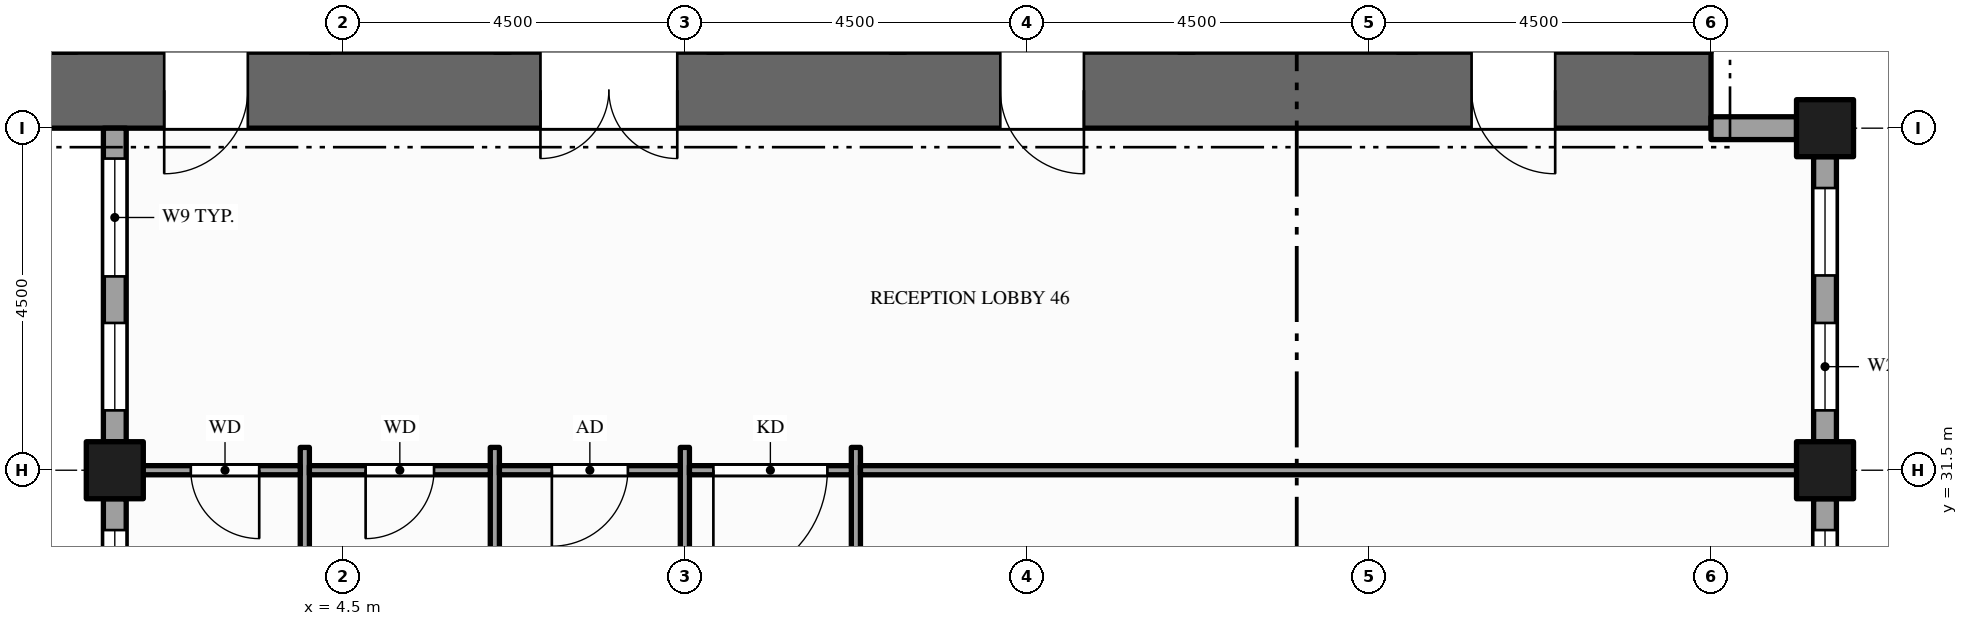
"""IFC4 building model, lengths in metres.
Left out: names, types, materials, properties, quantities, classifications, styles, units other than length and angle.
Written with IfcOpenShell. Run it as: python <this file> out.ifc"""

import sys

from ifc_helpers import new_model, si_unit, direction, frame, frame_2d, origin, origin_2d, place, context, subcontext, project, spatial, rectangle, hollow_rectangle, extrude, element, fill, save


model = new_model("IFC4")
c1 = context("Model", 3, precision=1e-05, world=origin(), true_north=direction((0.0, 1.0)))
c2 = subcontext(c1, "Body", "Model", "MODEL_VIEW")
j1 = project(units=[si_unit("LENGTHUNIT", "METRE"), si_unit("PLANEANGLEUNIT", "RADIAN")], contexts=[c1])
p1 = place(None, origin())
s1 = spatial("IfcSite", under=j1, at=p1, CompositionType="ELEMENT")
p2 = place(p1, origin())
s2 = spatial("IfcBuilding", under=s1, at=p2, CompositionType="ELEMENT")
p3 = place(p2, frame((0.0, 0.0, 235.0)))
s3 = spatial("IfcBuildingStorey", under=s2, at=p3, CompositionType="ELEMENT", Elevation=235.0)
p4 = place(p3, frame((0.0, 36.5, -0.15), z_axis=(0.0, 0.0, 1.0), x_axis=(1.0, 0.0, 0.0)))
e1 = element("IfcWall", 1, at=p4, inside=s3, PredefinedType="SHEAR", context=c2, shape_type="SweptSolid", body=[
    extrude(rectangle(XDim=22.5, YDim=1.0, at=frame_2d((11.25, 0.0))), origin(), (0.0, 0.0, 1.0), 4.0),
])
p5 = place(p4, frame((7.1, 0.0, 0.15)))
e2 = element("IfcOpeningElement", 2, at=p5, cuts=e1, PredefinedType="OPENING", context=c2, shape_type="SweptSolid", body=[
    extrude(rectangle(XDim=1.8, YDim=2.1, at=frame_2d((0.9, 1.05))), frame((0.0, 0.51, 0.0), z_axis=(0.0, -1.0, 0.0), x_axis=(1.0, 0.0, 0.0)), (0.0, 0.0, 1.0), 1.02),
])
p6 = place(p4, frame((13.15, 0.0, 0.15)))
e3 = element("IfcOpeningElement", 3, at=p6, cuts=e1, PredefinedType="OPENING", context=c2, shape_type="SweptSolid", body=[
    extrude(rectangle(XDim=1.1, YDim=2.1, at=frame_2d((0.55, 1.05))), frame((0.0, 0.51, 0.0), z_axis=(0.0, -1.0, 0.0), x_axis=(1.0, 0.0, 0.0)), (0.0, 0.0, 1.0), 1.02),
])
p7 = place(p4, frame((2.15, 0.0, 0.15)))
e4 = element("IfcOpeningElement", 4, at=p7, cuts=e1, PredefinedType="OPENING", context=c2, shape_type="SweptSolid", body=[
    extrude(rectangle(XDim=1.1, YDim=2.1, at=frame_2d((0.55, 1.05))), frame((0.0, 0.51, 0.0), z_axis=(0.0, -1.0, 0.0), x_axis=(1.0, 0.0, 0.0)), (0.0, 0.0, 1.0), 1.02),
])
p8 = place(p4, frame((19.35, 0.0, 0.15)))
e5 = element("IfcOpeningElement", 5, at=p8, cuts=e1, PredefinedType="OPENING", context=c2, shape_type="SweptSolid", body=[
    extrude(rectangle(XDim=1.1, YDim=2.1, at=frame_2d((0.55, 1.05))), frame((0.0, 0.51, 0.0), z_axis=(0.0, -1.0, 0.0), x_axis=(1.0, 0.0, 0.0)), (0.0, 0.0, 1.0), 1.02),
])
for number, where, z_axis, x_axis in (
    (6, (1.5, 31.5, -0.15), (0.0, 0.0, 1.0), (1.0, 0.0, 0.0)),
    (7, (24.0, 31.5, -0.15), (0.0, 0.0, 1.0), (1.0, 0.0, 0.0)),
    (8, (24.0, 36.0, -0.15), (0.0, 0.0, 1.0), (1.0, 0.0, 0.0)),
):
    element("IfcColumn", number, at=place(p3, frame(where, z_axis=z_axis, x_axis=x_axis)), inside=s3, PredefinedType="COLUMN", context=c2, shape_type="SweptSolid", body=[
        extrude(hollow_rectangle(XDim=0.75, YDim=0.75, WallThickness=0.036, at=origin_2d()), origin(), (0.0, 0.0, 1.0), 4.0),
    ])
p9 = place(p3, frame((24.0, 25.875, 0.0), z_axis=(0.0, 0.0, 1.0), x_axis=(0.0, 1.0, 0.0)))
e9 = element("IfcWall", 9, at=p9, inside=s3, PredefinedType="STANDARD", context=c2, shape_type="SweptSolid", body=[
    extrude(rectangle(XDim=5.25, YDim=0.3, at=frame_2d((2.625, 0.0))), origin(), (0.0, 0.0, 1.0), 3.157),
])
p10 = place(p9, frame((1.425, 0.0, 0.9)))
e10 = element("IfcOpeningElement", 10, at=p10, cuts=e9, PredefinedType="OPENING", context=c2, shape_type="SweptSolid", body=[
    extrude(rectangle(XDim=1.65, YDim=2.0, at=frame_2d((0.825, 1.0))), frame((0.0, 0.16, 0.0), z_axis=(0.0, -1.0, 0.0), x_axis=(1.0, 0.0, 0.0)), (0.0, 0.0, 1.0), 0.32),
])
p11 = place(p9, frame((3.688, 0.0, 0.9)))
e11 = element("IfcOpeningElement", 11, at=p11, cuts=e9, PredefinedType="OPENING", context=c2, shape_type="SweptSolid", body=[
    extrude(rectangle(XDim=1.15, YDim=2.0, at=frame_2d((0.575, 1.0))), frame((0.0, 0.16, 0.0), z_axis=(0.0, -1.0, 0.0), x_axis=(1.0, 0.0, 0.0)), (0.0, 0.0, 1.0), 0.32),
])
p12 = place(p3, frame((24.0, 31.875, 0.0), z_axis=(0.0, 0.0, 1.0), x_axis=(0.0, 1.0, 0.0)))
e12 = element("IfcWall", 12, at=p12, inside=s3, PredefinedType="STANDARD", context=c2, shape_type="SweptSolid", body=[
    extrude(rectangle(XDim=3.75, YDim=0.3, at=frame_2d((1.875, 0.0))), origin(), (0.0, 0.0, 1.0), 3.157),
])
p13 = place(p12, frame((0.413, 0.0, 0.9)))
e13 = element("IfcOpeningElement", 13, at=p13, cuts=e12, PredefinedType="OPENING", context=c2, shape_type="SweptSolid", body=[
    extrude(rectangle(XDim=1.15, YDim=2.0, at=frame_2d((0.575, 1.0))), frame((0.0, 0.16, 0.0), z_axis=(0.0, -1.0, 0.0), x_axis=(1.0, 0.0, 0.0)), (0.0, 0.0, 1.0), 0.32),
])
p14 = place(p12, frame((2.188, 0.0, 0.9)))
e14 = element("IfcOpeningElement", 14, at=p14, cuts=e12, PredefinedType="OPENING", context=c2, shape_type="SweptSolid", body=[
    extrude(rectangle(XDim=1.15, YDim=2.0, at=frame_2d((0.575, 1.0))), frame((0.0, 0.16, 0.0), z_axis=(0.0, -1.0, 0.0), x_axis=(1.0, 0.0, 0.0)), (0.0, 0.0, 1.0), 0.32),
])
p15 = place(p3, frame((23.625, 36.0, 0.0), z_axis=(0.0, 0.0, 1.0), x_axis=(-1.0, 0.0, 0.0)))
e15 = element("IfcWall", 15, at=p15, inside=s3, PredefinedType="STANDARD", context=c2, shape_type="SweptSolid", body=[
    extrude(rectangle(XDim=1.125, YDim=0.3, at=frame_2d((0.562, 0.0))), origin(), (0.0, 0.0, 1.0), 2.87),
])
p16 = place(p3, frame((1.5, 36.0, 0.0), z_axis=(0.0, 0.0, 1.0), x_axis=(0.0, -1.0, 0.0)))
e16 = element("IfcWall", 16, at=p16, inside=s3, PredefinedType="STANDARD", context=c2, shape_type="SweptSolid", body=[
    extrude(rectangle(XDim=4.125, YDim=0.3, at=frame_2d((2.062, 0.0))), origin(), (0.0, 0.0, 1.0), 3.157),
])
p17 = place(p16, frame((0.4, 0.0, 0.9)))
e17 = element("IfcOpeningElement", 17, at=p17, cuts=e16, PredefinedType="OPENING", context=c2, shape_type="SweptSolid", body=[
    extrude(rectangle(XDim=1.55, YDim=2.0, at=frame_2d((0.775, 1.0))), frame((0.0, 0.16, 0.0), z_axis=(0.0, -1.0, 0.0), x_axis=(1.0, 0.0, 0.0)), (0.0, 0.0, 1.0), 0.32),
])
p18 = place(p16, frame((2.562, 0.0, 0.9)))
e18 = element("IfcOpeningElement", 18, at=p18, cuts=e16, PredefinedType="OPENING", context=c2, shape_type="SweptSolid", body=[
    extrude(rectangle(XDim=1.15, YDim=2.0, at=frame_2d((0.575, 1.0))), frame((0.0, 0.16, 0.0), z_axis=(0.0, -1.0, 0.0), x_axis=(1.0, 0.0, 0.0)), (0.0, 0.0, 1.0), 0.32),
])
p19 = place(p3, frame((1.5, 31.125, 0.0), z_axis=(0.0, 0.0, 1.0), x_axis=(0.0, -1.0, 0.0)))
e19 = element("IfcWall", 19, at=p19, inside=s3, PredefinedType="STANDARD", context=c2, shape_type="SweptSolid", body=[
    extrude(rectangle(XDim=3.75, YDim=0.3, at=frame_2d((1.875, 0.0))), origin(), (0.0, 0.0, 1.0), 3.157),
])
p20 = place(p19, frame((0.413, 0.0, 0.9)))
e20 = element("IfcOpeningElement", 20, at=p20, cuts=e19, PredefinedType="OPENING", context=c2, shape_type="SweptSolid", body=[
    extrude(rectangle(XDim=1.15, YDim=2.0, at=frame_2d((0.575, 1.0))), frame((0.0, 0.16, 0.0), z_axis=(0.0, -1.0, 0.0), x_axis=(1.0, 0.0, 0.0)), (0.0, 0.0, 1.0), 0.32),
])
p21 = place(p19, frame((2.188, 0.0, 0.9)))
e21 = element("IfcOpeningElement", 21, at=p21, cuts=e19, PredefinedType="OPENING", context=c2, shape_type="SweptSolid", body=[
    extrude(rectangle(XDim=1.15, YDim=2.0, at=frame_2d((0.575, 1.0))), frame((0.0, 0.16, 0.0), z_axis=(0.0, -1.0, 0.0), x_axis=(1.0, 0.0, 0.0)), (0.0, 0.0, 1.0), 0.32),
])
for number, where, z_axis, x_axis in (
    (22, (4.0, 26.7, 0.0), (0.0, 0.0, 1.0), (0.0, 1.0, 0.0)),
    (23, (6.5, 26.7, 0.0), (0.0, 0.0, 1.0), (0.0, 1.0, 0.0)),
):
    element("IfcWall", number, at=place(p3, frame(where, z_axis=z_axis, x_axis=x_axis)), inside=s3, PredefinedType="PARTITIONING", context=c2, shape_type="SweptSolid", body=[
        extrude(rectangle(XDim=5.1, YDim=0.12, at=frame_2d((2.55, 0.0))), origin(), (0.0, 0.0, 1.0), 3.85),
    ])
p22 = place(p3, frame((9.0, 13.2, 0.0), z_axis=(0.0, 0.0, 1.0), x_axis=(0.0, 1.0, 0.0)))
e24 = element("IfcWall", 24, at=p22, inside=s3, PredefinedType="PARTITIONING", context=c2, shape_type="SweptSolid", body=[
    extrude(rectangle(XDim=18.6, YDim=0.12, at=frame_2d((9.3, 0.0))), origin(), (0.0, 0.0, 1.0), 2.6),
])
p23 = place(p22, frame((3.175, 0.0, 0.0)))
e25 = element("IfcOpeningElement", 25, at=p23, cuts=e24, PredefinedType="OPENING", context=c2, shape_type="SweptSolid", body=[
    extrude(rectangle(XDim=1.0, YDim=2.1, at=frame_2d((0.5, 1.05))), frame((0.0, 0.07, 0.0), z_axis=(0.0, -1.0, 0.0), x_axis=(1.0, 0.0, 0.0)), (0.0, 0.0, 1.0), 0.14),
])
p24 = place(p22, frame((9.955, 0.0, 0.0)))
e26 = element("IfcOpeningElement", 26, at=p24, cuts=e24, PredefinedType="OPENING", context=c2, shape_type="SweptSolid", body=[
    extrude(rectangle(XDim=1.0, YDim=2.1, at=frame_2d((0.5, 1.05))), frame((0.0, 0.07, 0.0), z_axis=(0.0, -1.0, 0.0), x_axis=(1.0, 0.0, 0.0)), (0.0, 0.0, 1.0), 0.14),
])
p25 = place(p3, frame((11.25, 13.2, 0.0), z_axis=(0.0, 0.0, 1.0), x_axis=(0.0, 1.0, 0.0)))
e27 = element("IfcWall", 27, at=p25, inside=s3, PredefinedType="PARTITIONING", context=c2, shape_type="SweptSolid", body=[
    extrude(rectangle(XDim=18.6, YDim=0.12, at=frame_2d((9.3, 0.0))), origin(), (0.0, 0.0, 1.0), 2.6),
])
p26 = place(p25, frame((4.2, 0.0, 0.0)))
e28 = element("IfcOpeningElement", 28, at=p26, cuts=e27, PredefinedType="OPENING", context=c2, shape_type="SweptSolid", body=[
    extrude(rectangle(XDim=1.2, YDim=2.1, at=frame_2d((0.6, 1.05))), frame((0.0, 0.07, 0.0), z_axis=(0.0, -1.0, 0.0), x_axis=(1.0, 0.0, 0.0)), (0.0, 0.0, 1.0), 0.14),
])
p27 = place(p3, frame((1.65, 31.5, 0.0), z_axis=(0.0, 0.0, 1.0), x_axis=(1.0, 0.0, 0.0)))
e29 = element("IfcWall", 29, at=p27, inside=s3, PredefinedType="PARTITIONING", context=c2, shape_type="SweptSolid", body=[
    extrude(rectangle(XDim=2.29, YDim=0.12, at=frame_2d((1.145, 0.0))), origin(), (0.0, 0.0, 1.0), 2.87),
])
p28 = place(p27, frame((0.85, 0.0, 0.0)))
e30 = element("IfcOpeningElement", 30, at=p28, cuts=e29, PredefinedType="OPENING", context=c2, shape_type="SweptSolid", body=[
    extrude(rectangle(XDim=0.9, YDim=2.1, at=frame_2d((0.45, 1.05))), frame((0.0, 0.07, 0.0), z_axis=(0.0, -1.0, 0.0), x_axis=(1.0, 0.0, 0.0)), (0.0, 0.0, 1.0), 0.14),
])
p29 = place(p3, frame((4.06, 31.5, 0.0), z_axis=(0.0, 0.0, 1.0), x_axis=(1.0, 0.0, 0.0)))
e31 = element("IfcWall", 31, at=p29, inside=s3, PredefinedType="PARTITIONING", context=c2, shape_type="SweptSolid", body=[
    extrude(rectangle(XDim=2.38, YDim=0.12, at=frame_2d((1.19, 0.0))), origin(), (0.0, 0.0, 1.0), 2.87),
])
p30 = place(p29, frame((0.74, 0.0, 0.0)))
e32 = element("IfcOpeningElement", 32, at=p30, cuts=e31, PredefinedType="OPENING", context=c2, shape_type="SweptSolid", body=[
    extrude(rectangle(XDim=0.9, YDim=2.1, at=frame_2d((0.45, 1.05))), frame((0.0, 0.07, 0.0), z_axis=(0.0, -1.0, 0.0), x_axis=(1.0, 0.0, 0.0)), (0.0, 0.0, 1.0), 0.14),
])
p31 = place(p3, frame((6.56, 31.5, 0.0), z_axis=(0.0, 0.0, 1.0), x_axis=(1.0, 0.0, 0.0)))
e33 = element("IfcWall", 33, at=p31, inside=s3, PredefinedType="PARTITIONING", context=c2, shape_type="SweptSolid", body=[
    extrude(rectangle(XDim=2.38, YDim=0.12, at=frame_2d((1.19, 0.0))), origin(), (0.0, 0.0, 1.0), 2.87),
])
p32 = place(p31, frame((0.69, 0.0, 0.0)))
e34 = element("IfcOpeningElement", 34, at=p32, cuts=e33, PredefinedType="OPENING", context=c2, shape_type="SweptSolid", body=[
    extrude(rectangle(XDim=1.0, YDim=2.1, at=frame_2d((0.5, 1.05))), frame((0.0, 0.07, 0.0), z_axis=(0.0, -1.0, 0.0), x_axis=(1.0, 0.0, 0.0)), (0.0, 0.0, 1.0), 0.14),
])
p33 = place(p3, frame((9.06, 31.5, 0.0), z_axis=(0.0, 0.0, 1.0), x_axis=(1.0, 0.0, 0.0)))
e35 = element("IfcWall", 35, at=p33, inside=s3, PredefinedType="PARTITIONING", context=c2, shape_type="SweptSolid", body=[
    extrude(rectangle(XDim=2.13, YDim=0.12, at=frame_2d((1.065, 0.0))), origin(), (0.0, 0.0, 1.0), 2.87),
])
p34 = place(p33, frame((0.315, 0.0, 0.0)))
e36 = element("IfcOpeningElement", 36, at=p34, cuts=e35, PredefinedType="OPENING", context=c2, shape_type="SweptSolid", body=[
    extrude(rectangle(XDim=1.5, YDim=2.1, at=frame_2d((0.75, 1.05))), frame((0.0, 0.07, 0.0), z_axis=(0.0, -1.0, 0.0), x_axis=(1.0, 0.0, 0.0)), (0.0, 0.0, 1.0), 0.14),
])
p35 = place(p3, frame((11.31, 31.5, 0.0), z_axis=(0.0, 0.0, 1.0), x_axis=(1.0, 0.0, 0.0)))
e37 = element("IfcWall", 37, at=p35, inside=s3, PredefinedType="PARTITIONING", context=c2, shape_type="SweptSolid", body=[
    extrude(rectangle(XDim=12.54, YDim=0.12, at=frame_2d((6.27, 0.0))), origin(), (0.0, 0.0, 1.0), 2.87),
])
p36 = place(p11, origin())
e38 = element("IfcWindow", 38, at=p36, inside=s3, PartitioningType="SINGLE_PANEL", PredefinedType="WINDOW", context=c2, shape_type="SweptSolid", body=[
    extrude(rectangle(XDim=1.15, YDim=2.0, at=frame_2d((0.575, 1.0))), frame((0.0, 0.03, 0.0), z_axis=(0.0, -1.0, 0.0), x_axis=(1.0, 0.0, 0.0)), (0.0, 0.0, 1.0), 0.06),
])
fill(e11, e38)
p37 = place(p13, origin())
e39 = element("IfcWindow", 39, at=p37, inside=s3, PartitioningType="SINGLE_PANEL", PredefinedType="WINDOW", context=c2, shape_type="SweptSolid", body=[
    extrude(rectangle(XDim=1.15, YDim=2.0, at=frame_2d((0.575, 1.0))), frame((0.0, 0.03, 0.0), z_axis=(0.0, -1.0, 0.0), x_axis=(1.0, 0.0, 0.0)), (0.0, 0.0, 1.0), 0.06),
])
fill(e13, e39)
p38 = place(p14, origin())
e40 = element("IfcWindow", 40, at=p38, inside=s3, PartitioningType="SINGLE_PANEL", PredefinedType="WINDOW", context=c2, shape_type="SweptSolid", body=[
    extrude(rectangle(XDim=1.15, YDim=2.0, at=frame_2d((0.575, 1.0))), frame((0.0, 0.03, 0.0), z_axis=(0.0, -1.0, 0.0), x_axis=(1.0, 0.0, 0.0)), (0.0, 0.0, 1.0), 0.06),
])
fill(e14, e40)
p39 = place(p17, origin())
e41 = element("IfcWindow", 41, at=p39, inside=s3, PartitioningType="SINGLE_PANEL", PredefinedType="WINDOW", context=c2, shape_type="SweptSolid", body=[
    extrude(rectangle(XDim=1.55, YDim=2.0, at=frame_2d((0.775, 1.0))), frame((0.0, 0.03, 0.0), z_axis=(0.0, -1.0, 0.0), x_axis=(1.0, 0.0, 0.0)), (0.0, 0.0, 1.0), 0.06),
])
fill(e17, e41)
p40 = place(p18, origin())
e42 = element("IfcWindow", 42, at=p40, inside=s3, PartitioningType="SINGLE_PANEL", PredefinedType="WINDOW", context=c2, shape_type="SweptSolid", body=[
    extrude(rectangle(XDim=1.15, YDim=2.0, at=frame_2d((0.575, 1.0))), frame((0.0, 0.03, 0.0), z_axis=(0.0, -1.0, 0.0), x_axis=(1.0, 0.0, 0.0)), (0.0, 0.0, 1.0), 0.06),
])
fill(e18, e42)
p41 = place(p20, origin())
e43 = element("IfcWindow", 43, at=p41, inside=s3, PartitioningType="SINGLE_PANEL", PredefinedType="WINDOW", context=c2, shape_type="SweptSolid", body=[
    extrude(rectangle(XDim=1.15, YDim=2.0, at=frame_2d((0.575, 1.0))), frame((0.0, 0.03, 0.0), z_axis=(0.0, -1.0, 0.0), x_axis=(1.0, 0.0, 0.0)), (0.0, 0.0, 1.0), 0.06),
])
fill(e20, e43)
p42 = place(p5, origin())
e44 = element("IfcDoor", 44, at=p42, inside=s3, OperationType="DOUBLE_DOOR_SINGLE_SWING", PredefinedType="DOOR", context=c2, shape_type="SweptSolid", body=[
    extrude(rectangle(XDim=1.8, YDim=2.1, at=frame_2d((0.9, 1.05))), frame((0.0, 0.025, 0.0), z_axis=(0.0, -1.0, 0.0), x_axis=(1.0, 0.0, 0.0)), (0.0, 0.0, 1.0), 0.05),
])
fill(e2, e44)
p43 = place(p6, origin())
e45 = element("IfcDoor", 45, at=p43, inside=s3, OperationType="SINGLE_SWING_RIGHT", PredefinedType="DOOR", context=c2, shape_type="SweptSolid", body=[
    extrude(rectangle(XDim=1.1, YDim=2.1, at=frame_2d((0.55, 1.05))), frame((0.0, 0.025, 0.0), z_axis=(0.0, -1.0, 0.0), x_axis=(1.0, 0.0, 0.0)), (0.0, 0.0, 1.0), 0.05),
])
fill(e3, e45)
p44 = place(p7, origin())
e46 = element("IfcDoor", 46, at=p44, inside=s3, OperationType="SINGLE_SWING_LEFT", PredefinedType="DOOR", context=c2, shape_type="SweptSolid", body=[
    extrude(rectangle(XDim=1.1, YDim=2.1, at=frame_2d((0.55, 1.05))), frame((0.0, 0.025, 0.0), z_axis=(0.0, -1.0, 0.0), x_axis=(1.0, 0.0, 0.0)), (0.0, 0.0, 1.0), 0.05),
])
fill(e4, e46)
p45 = place(p8, origin())
e47 = element("IfcDoor", 47, at=p45, inside=s3, OperationType="SINGLE_SWING_RIGHT", PredefinedType="DOOR", context=c2, shape_type="SweptSolid", body=[
    extrude(rectangle(XDim=1.1, YDim=2.1, at=frame_2d((0.55, 1.05))), frame((0.0, 0.025, 0.0), z_axis=(0.0, -1.0, 0.0), x_axis=(1.0, 0.0, 0.0)), (0.0, 0.0, 1.0), 0.05),
])
fill(e5, e47)
p46 = place(p34, origin())
e48 = element("IfcDoor", 48, at=p46, inside=s3, OperationType="SINGLE_SWING_LEFT", PredefinedType="DOOR", context=c2, shape_type="SweptSolid", body=[
    extrude(rectangle(XDim=1.5, YDim=2.1, at=frame_2d((0.75, 1.05))), frame((0.0, 0.025, 0.0), z_axis=(0.0, -1.0, 0.0), x_axis=(1.0, 0.0, 0.0)), (0.0, 0.0, 1.0), 0.05),
])
fill(e36, e48)
p47 = place(p28, origin())
e49 = element("IfcDoor", 49, at=p47, inside=s3, OperationType="SINGLE_SWING_RIGHT", PredefinedType="DOOR", context=c2, shape_type="SweptSolid", body=[
    extrude(rectangle(XDim=0.9, YDim=2.1, at=frame_2d((0.45, 1.05))), frame((0.0, 0.025, 0.0), z_axis=(0.0, -1.0, 0.0), x_axis=(1.0, 0.0, 0.0)), (0.0, 0.0, 1.0), 0.05),
])
fill(e30, e49)
p48 = place(p30, origin())
e50 = element("IfcDoor", 50, at=p48, inside=s3, OperationType="SINGLE_SWING_LEFT", PredefinedType="DOOR", context=c2, shape_type="SweptSolid", body=[
    extrude(rectangle(XDim=0.9, YDim=2.1, at=frame_2d((0.45, 1.05))), frame((0.0, 0.025, 0.0), z_axis=(0.0, -1.0, 0.0), x_axis=(1.0, 0.0, 0.0)), (0.0, 0.0, 1.0), 0.05),
])
fill(e32, e50)
p49 = place(p32, origin())
e51 = element("IfcDoor", 51, at=p49, inside=s3, OperationType="SINGLE_SWING_LEFT", PredefinedType="DOOR", context=c2, shape_type="SweptSolid", body=[
    extrude(rectangle(XDim=1.0, YDim=2.1, at=frame_2d((0.5, 1.05))), frame((0.0, 0.025, 0.0), z_axis=(0.0, -1.0, 0.0), x_axis=(1.0, 0.0, 0.0)), (0.0, 0.0, 1.0), 0.05),
])
fill(e34, e51)
save(model, sys.argv[1])
